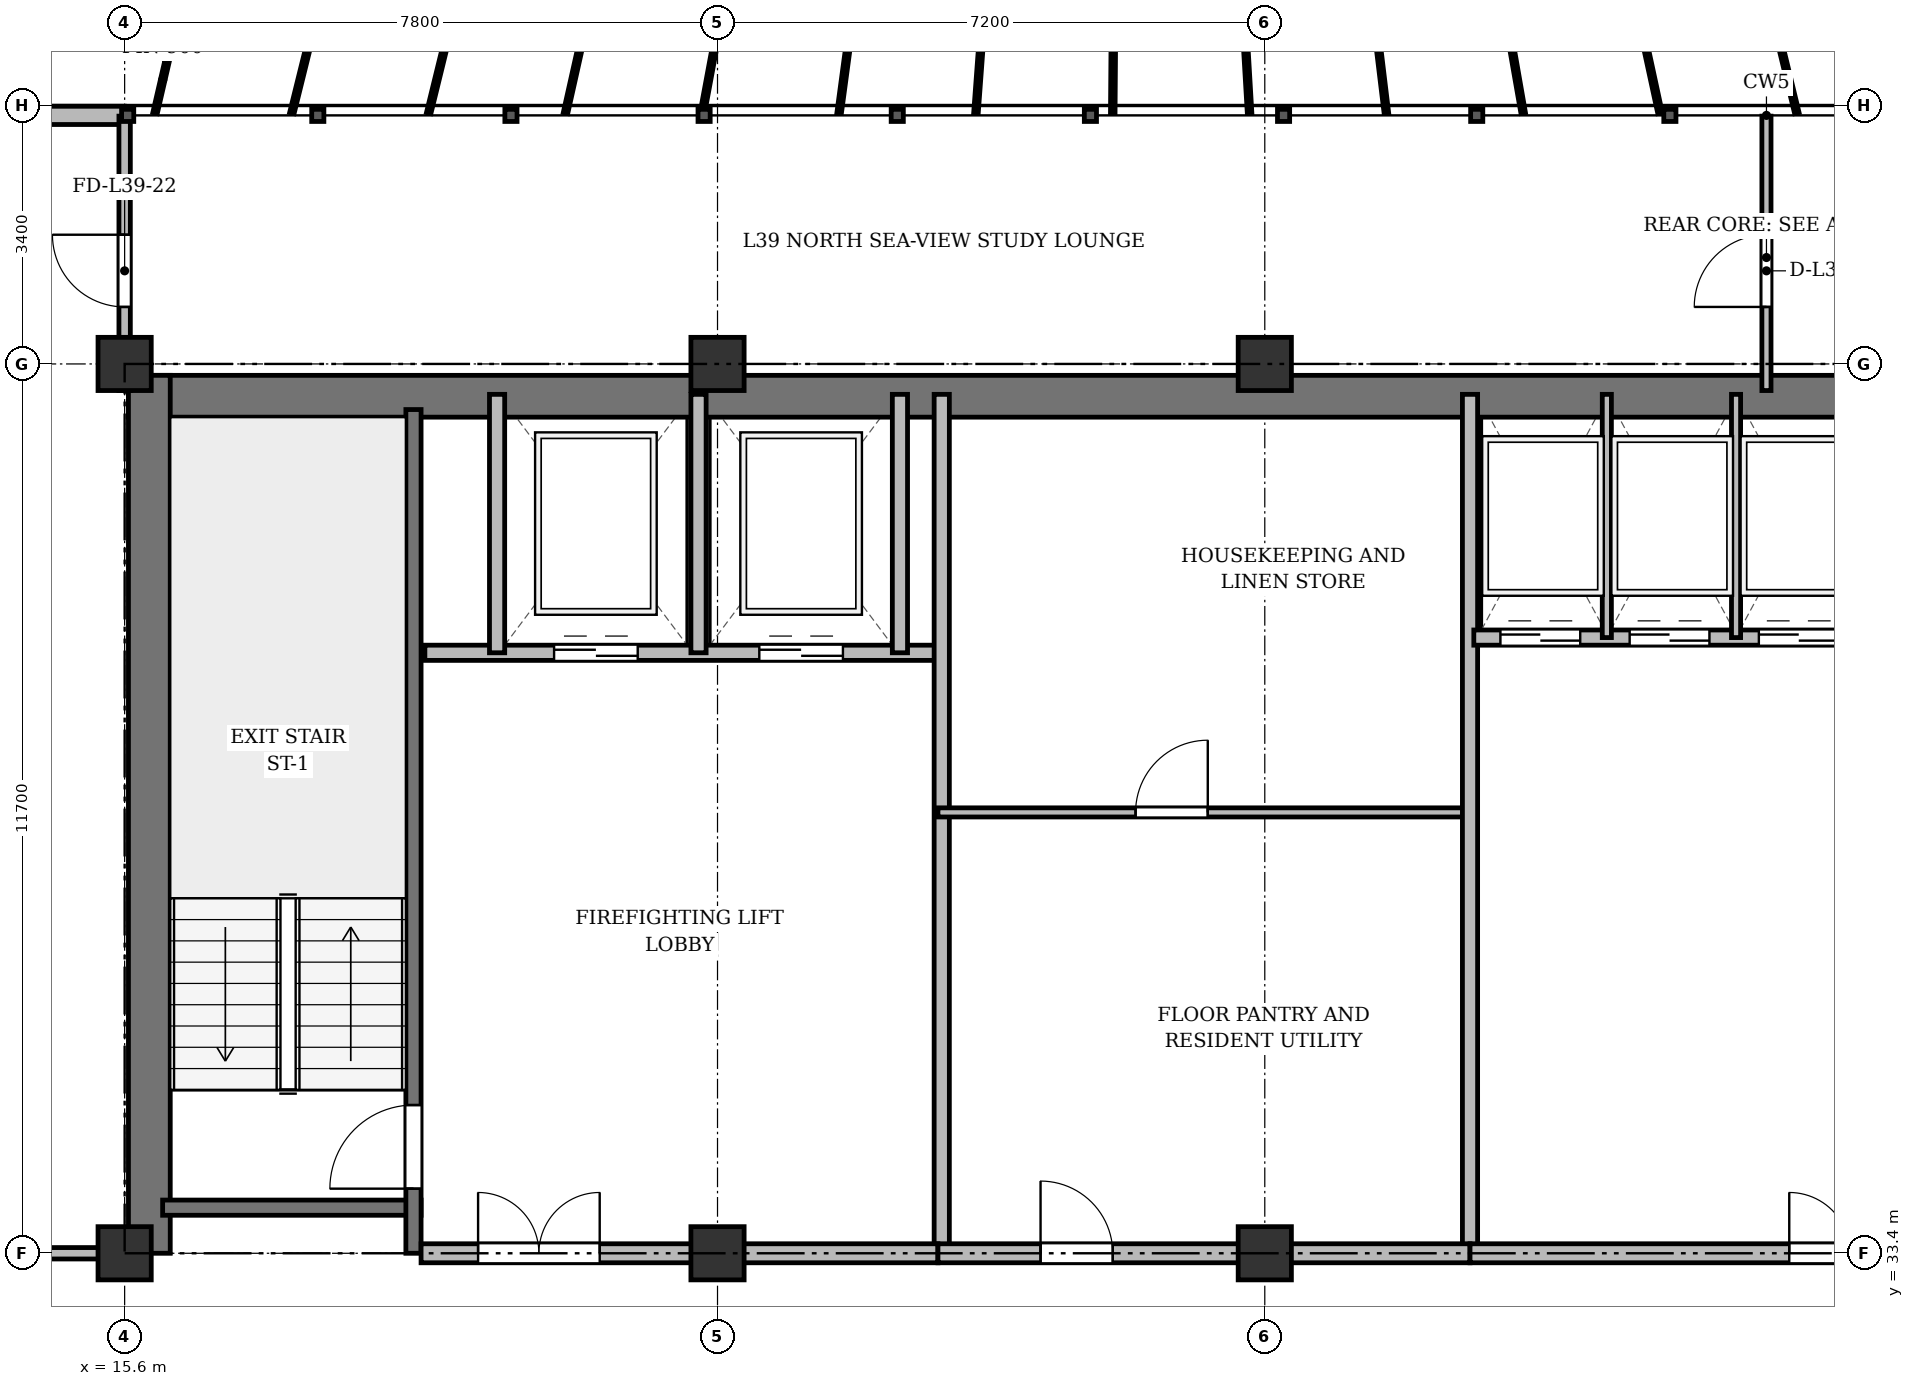
"""IFC4 building model, lengths in metres.
Left out: names, types, materials, properties, quantities, classifications, styles, units other than length and angle.
Written with IfcOpenShell. Run it as: python <this file> out.ifc"""

import sys

from ifc_helpers import new_model, si_unit, direction, frame, frame_2d, origin, origin_2d, place, context, subcontext, project, spatial, rectangle, extrude, source, transform, mapped, element, fill, save


model = new_model("IFC4")
c1 = context("Model", 3, precision=1e-05, world=origin(), true_north=direction((0.0, 1.0)))
c2 = subcontext(c1, "Body", "Model", "MODEL_VIEW")
j1 = project(units=[si_unit("LENGTHUNIT", "METRE"), si_unit("PLANEANGLEUNIT", "RADIAN")], contexts=[c1])
p1 = place(None, origin())
s1 = spatial("IfcSite", under=j1, at=p1, CompositionType="ELEMENT")
p2 = place(p1, origin())
s2 = spatial("IfcBuilding", under=s1, at=p2, CompositionType="ELEMENT")
p3 = place(p2, frame((0.0, 0.0, 150.1)))
s3 = spatial("IfcBuildingStorey", under=s2, at=p3, CompositionType="ELEMENT", Elevation=150.1)
m1 = source(origin(), c2, "Body", "SweptSolid", [
    extrude(rectangle(XDim=0.7, YDim=0.7, at=origin_2d()), origin(), (0.0, 0.0, 1.0), 3.6),
])
for number, where, z_axis, x_axis in (
    (1, (15.6, 33.4, 0.0), (0.0, 0.0, 1.0), (1.0, 0.0, 0.0)),
    (2, (15.6, 45.1, 0.0), (0.0, 0.0, 1.0), (1.0, 0.0, 0.0)),
    (3, (23.4, 33.4, 0.0), (0.0, 0.0, 1.0), (1.0, 0.0, 0.0)),
    (4, (23.4, 45.1, 0.0), (0.0, 0.0, 1.0), (1.0, 0.0, 0.0)),
    (5, (30.6, 33.4, 0.0), (0.0, 0.0, 1.0), (1.0, 0.0, 0.0)),
    (6, (30.6, 45.1, 0.0), (0.0, 0.0, 1.0), (1.0, 0.0, 0.0)),
):
    element("IfcColumn", number, at=place(p3, frame(where, z_axis=z_axis, x_axis=x_axis)), inside=s3, PredefinedType="COLUMN", context=c2, shape_type="MappedRepresentation", body=[
        mapped(m1, transform((0.0, 0.0, 0.0), x_axis=(1.0, 0.0, 0.0), y_axis=(0.0, 1.0, 0.0), z_axis=(0.0, 0.0, 1.0), scale=1.0)),
    ])
p4 = place(p3, frame((10.9, 48.37, 0.0), z_axis=(0.0, 0.0, 1.0), x_axis=(1.0, 0.0, 0.0)))
e7 = element("IfcWall", 7, at=p4, inside=s3, PredefinedType="SOLIDWALL", context=c2, shape_type="SweptSolid", body=[
    extrude(rectangle(XDim=4.7, YDim=0.24, at=frame_2d((2.35, 0.0))), origin(), (0.0, 0.0, 1.0), 3.35),
])
p5 = place(p4, frame((1.675, 0.0, 0.9)))
e8 = element("IfcOpeningElement", 8, at=p5, cuts=e7, PredefinedType="OPENING", context=c2, shape_type="SweptSolid", body=[
    extrude(rectangle(XDim=1.35, YDim=1.5, at=frame_2d((0.675, 0.75))), frame((0.0, 0.13, 0.0), z_axis=(0.0, -1.0, 0.0), x_axis=(1.0, 0.0, 0.0)), (0.0, 0.0, 1.0), 0.26),
])
p6 = place(p3, frame((15.65, 44.675, 0.0), z_axis=(0.0, 0.0, 1.0), x_axis=(1.0, 0.0, 0.0)))
e9 = element("IfcWall", 9, at=p6, inside=s3, PredefinedType="SHEAR", context=c2, shape_type="SweptSolid", body=[
    extrude(rectangle(XDim=43.1, YDim=0.55, at=frame_2d((21.55, 0.0))), origin(), (0.0, 0.0, 1.0), 3.35),
])
p7 = place(p3, frame((15.925, 33.4, 0.0), z_axis=(0.0, 0.0, 1.0), x_axis=(0.0, 1.0, 0.0)))
e10 = element("IfcWall", 10, at=p7, inside=s3, PredefinedType="SHEAR", context=c2, shape_type="SweptSolid", body=[
    extrude(rectangle(XDim=11.55, YDim=0.55, at=frame_2d((5.775, 0.0))), origin(), (0.0, 0.0, 1.0), 3.35),
])
p8 = place(p3, frame((16.1, 34.0, 0.0), z_axis=(0.0, 0.0, 1.0), x_axis=(1.0, 0.0, 0.0)))
e11 = element("IfcWall", 11, at=p8, inside=s3, PredefinedType="SHEAR", context=c2, shape_type="SweptSolid", body=[
    extrude(rectangle(XDim=3.4, YDim=0.2, at=frame_2d((1.7, 0.0))), origin(), (0.0, 0.0, 1.0), 3.35),
])
p9 = place(p3, frame((19.4, 33.4, 0.0), z_axis=(0.0, 0.0, 1.0), x_axis=(0.0, 1.0, 0.0)))
e12 = element("IfcWall", 12, at=p9, inside=s3, PredefinedType="SHEAR", context=c2, shape_type="SweptSolid", body=[
    extrude(rectangle(XDim=11.1, YDim=0.2, at=frame_2d((5.55, 0.0))), origin(), (0.0, 0.0, 1.0), 3.35),
])
p10 = place(p9, frame((0.85, 0.0, 0.0)))
e13 = element("IfcOpeningElement", 13, at=p10, cuts=e12, PredefinedType="OPENING", context=c2, shape_type="SweptSolid", body=[
    extrude(rectangle(XDim=1.1, YDim=2.15, at=frame_2d((0.55, 1.075))), frame((0.0, 0.11, 0.0), z_axis=(0.0, -1.0, 0.0), x_axis=(1.0, 0.0, 0.0)), (0.0, 0.0, 1.0), 0.22),
])
p11 = place(p3, frame((19.55, 41.3, 0.0), z_axis=(0.0, 0.0, 1.0), x_axis=(1.0, 0.0, 0.0)))
e14 = element("IfcWall", 14, at=p11, inside=s3, PredefinedType="SOLIDWALL", context=c2, shape_type="SweptSolid", body=[
    extrude(rectangle(XDim=6.75, YDim=0.2, at=frame_2d((3.375, 0.0))), origin(), (0.0, 0.0, 1.0), 3.35),
])
p12 = place(p11, frame((1.7, 0.0, 0.0)))
e15 = element("IfcOpeningElement", 15, at=p12, cuts=e14, PredefinedType="OPENING", context=c2, shape_type="SweptSolid", body=[
    extrude(rectangle(XDim=1.1, YDim=2.15, at=frame_2d((0.55, 1.075))), frame((0.0, 0.11, 0.0), z_axis=(0.0, -1.0, 0.0), x_axis=(1.0, 0.0, 0.0)), (0.0, 0.0, 1.0), 0.22),
])
p13 = place(p11, frame((4.4, 0.0, 0.0)))
e16 = element("IfcOpeningElement", 16, at=p13, cuts=e14, PredefinedType="OPENING", context=c2, shape_type="SweptSolid", body=[
    extrude(rectangle(XDim=1.1, YDim=2.15, at=frame_2d((0.55, 1.075))), frame((0.0, 0.11, 0.0), z_axis=(0.0, -1.0, 0.0), x_axis=(1.0, 0.0, 0.0)), (0.0, 0.0, 1.0), 0.22),
])
for number, where, z_axis, x_axis in (
    (17, (20.5, 41.3, 0.0), (0.0, 0.0, 1.0), (0.0, 1.0, 0.0)),
    (18, (23.15, 41.3, 0.0), (0.0, 0.0, 1.0), (0.0, 1.0, 0.0)),
    (19, (25.8, 41.3, 0.0), (0.0, 0.0, 1.0), (0.0, 1.0, 0.0)),
):
    element("IfcWall", number, at=place(p3, frame(where, z_axis=z_axis, x_axis=x_axis)), inside=s3, PredefinedType="SOLIDWALL", context=c2, shape_type="SweptSolid", body=[
        extrude(rectangle(XDim=3.4, YDim=0.2, at=frame_2d((1.7, 0.0))), origin(), (0.0, 0.0, 1.0), 3.35),
    ])
p14 = place(p3, frame((26.35, 33.4, 0.0), z_axis=(0.0, 0.0, 1.0), x_axis=(0.0, 1.0, 0.0)))
e20 = element("IfcWall", 20, at=p14, inside=s3, PredefinedType="SOLIDWALL", context=c2, shape_type="SweptSolid", body=[
    extrude(rectangle(XDim=11.3, YDim=0.2, at=frame_2d((5.65, 0.0))), origin(), (0.0, 0.0, 1.0), 2.75),
])
p15 = place(p3, frame((19.5, 33.4, 0.0), z_axis=(0.0, 0.0, 1.0), x_axis=(1.0, 0.0, 0.0)))
e21 = element("IfcWall", 21, at=p15, inside=s3, PredefinedType="PARTITIONING", context=c2, shape_type="SweptSolid", body=[
    extrude(rectangle(XDim=6.8, YDim=0.25, at=frame_2d((3.4, 0.0))), origin(), (0.0, 0.0, 1.0), 2.75),
])
p16 = place(p15, frame((0.75, 0.0, 0.0)))
e22 = element("IfcOpeningElement", 22, at=p16, cuts=e21, PredefinedType="OPENING", context=c2, shape_type="SweptSolid", body=[
    extrude(rectangle(XDim=1.6, YDim=2.2, at=frame_2d((0.8, 1.1))), frame((0.0, 0.135, 0.0), z_axis=(0.0, -1.0, 0.0), x_axis=(1.0, 0.0, 0.0)), (0.0, 0.0, 1.0), 0.27),
])
p17 = place(p3, frame((26.3, 39.2, 0.0), z_axis=(0.0, 0.0, 1.0), x_axis=(1.0, 0.0, 0.0)))
e23 = element("IfcWall", 23, at=p17, inside=s3, PredefinedType="PARTITIONING", context=c2, shape_type="SweptSolid", body=[
    extrude(rectangle(XDim=7.0, YDim=0.12, at=frame_2d((3.5, 0.0))), origin(), (0.0, 0.0, 1.0), 2.85),
])
p18 = place(p17, frame((2.6, 0.0, 0.0)))
e24 = element("IfcOpeningElement", 24, at=p18, cuts=e23, PredefinedType="OPENING", context=c2, shape_type="SweptSolid", body=[
    extrude(rectangle(XDim=0.95, YDim=2.15, at=frame_2d((0.475, 1.075))), frame((0.0, 0.07, 0.0), z_axis=(0.0, -1.0, 0.0), x_axis=(1.0, 0.0, 0.0)), (0.0, 0.0, 1.0), 0.14),
])
p19 = place(p3, frame((33.3, 33.4, 0.0), z_axis=(0.0, 0.0, 1.0), x_axis=(0.0, 1.0, 0.0)))
e25 = element("IfcWall", 25, at=p19, inside=s3, PredefinedType="SOLIDWALL", context=c2, shape_type="SweptSolid", body=[
    extrude(rectangle(XDim=11.3, YDim=0.2, at=frame_2d((5.65, 0.0))), origin(), (0.0, 0.0, 1.0), 2.75),
])
p20 = place(p3, frame((33.35, 41.5, 0.0), z_axis=(0.0, 0.0, 1.0), x_axis=(1.0, 0.0, 0.0)))
e26 = element("IfcWall", 26, at=p20, inside=s3, PredefinedType="SOLIDWALL", context=c2, shape_type="SweptSolid", body=[
    extrude(rectangle(XDim=6.9, YDim=0.2, at=frame_2d((3.45, 0.0))), origin(), (0.0, 0.0, 1.0), 3.35),
])
p21 = place(p20, frame((0.35, 0.0, 0.0)))
e27 = element("IfcOpeningElement", 27, at=p21, cuts=e26, PredefinedType="OPENING", context=c2, shape_type="SweptSolid", body=[
    extrude(rectangle(XDim=1.05, YDim=2.15, at=frame_2d((0.525, 1.075))), frame((0.0, 0.11, 0.0), z_axis=(0.0, -1.0, 0.0), x_axis=(1.0, 0.0, 0.0)), (0.0, 0.0, 1.0), 0.22),
])
p22 = place(p20, frame((2.05, 0.0, 0.0)))
e28 = element("IfcOpeningElement", 28, at=p22, cuts=e26, PredefinedType="OPENING", context=c2, shape_type="SweptSolid", body=[
    extrude(rectangle(XDim=1.05, YDim=2.15, at=frame_2d((0.525, 1.075))), frame((0.0, 0.11, 0.0), z_axis=(0.0, -1.0, 0.0), x_axis=(1.0, 0.0, 0.0)), (0.0, 0.0, 1.0), 0.22),
])
p23 = place(p20, frame((3.75, 0.0, 0.0)))
e29 = element("IfcOpeningElement", 29, at=p23, cuts=e26, PredefinedType="OPENING", context=c2, shape_type="SweptSolid", body=[
    extrude(rectangle(XDim=1.05, YDim=2.15, at=frame_2d((0.525, 1.075))), frame((0.0, 0.11, 0.0), z_axis=(0.0, -1.0, 0.0), x_axis=(1.0, 0.0, 0.0)), (0.0, 0.0, 1.0), 0.22),
])
p24 = place(p20, frame((5.45, 0.0, 0.0)))
e30 = element("IfcOpeningElement", 30, at=p24, cuts=e26, PredefinedType="OPENING", context=c2, shape_type="SweptSolid", body=[
    extrude(rectangle(XDim=1.05, YDim=2.15, at=frame_2d((0.525, 1.075))), frame((0.0, 0.11, 0.0), z_axis=(0.0, -1.0, 0.0), x_axis=(1.0, 0.0, 0.0)), (0.0, 0.0, 1.0), 0.22),
])
for number, where, z_axis, x_axis in (
    (31, (35.1, 41.5, 0.0), (0.0, 0.0, 1.0), (0.0, 1.0, 0.0)),
    (32, (36.8, 41.5, 0.0), (0.0, 0.0, 1.0), (0.0, 1.0, 0.0)),
):
    element("IfcWall", number, at=place(p3, frame(where, z_axis=z_axis, x_axis=x_axis)), inside=s3, PredefinedType="PARTITIONING", context=c2, shape_type="SweptSolid", body=[
        extrude(rectangle(XDim=3.2, YDim=0.12, at=frame_2d((1.6, 0.0))), origin(), (0.0, 0.0, 1.0), 3.35),
    ])
p25 = place(p3, frame((26.3, 33.4, 0.0), z_axis=(0.0, 0.0, 1.0), x_axis=(1.0, 0.0, 0.0)))
e33 = element("IfcWall", 33, at=p25, inside=s3, PredefinedType="PARTITIONING", context=c2, shape_type="SweptSolid", body=[
    extrude(rectangle(XDim=7.0, YDim=0.25, at=frame_2d((3.5, 0.0))), origin(), (0.0, 0.0, 1.0), 2.75),
])
p26 = place(p25, frame((1.35, 0.0, 0.0)))
e34 = element("IfcOpeningElement", 34, at=p26, cuts=e33, PredefinedType="OPENING", context=c2, shape_type="SweptSolid", body=[
    extrude(rectangle(XDim=0.95, YDim=2.15, at=frame_2d((0.475, 1.075))), frame((0.0, 0.135, 0.0), z_axis=(0.0, -1.0, 0.0), x_axis=(1.0, 0.0, 0.0)), (0.0, 0.0, 1.0), 0.27),
])
p27 = place(p3, frame((33.3, 33.4, 0.0), z_axis=(0.0, 0.0, 1.0), x_axis=(1.0, 0.0, 0.0)))
e35 = element("IfcWall", 35, at=p27, inside=s3, PredefinedType="PARTITIONING", context=c2, shape_type="SweptSolid", body=[
    extrude(rectangle(XDim=13.85, YDim=0.25, at=frame_2d((6.925, 0.0))), origin(), (0.0, 0.0, 1.0), 2.75),
])
p28 = place(p27, frame((4.2, 0.0, 0.0)))
e36 = element("IfcOpeningElement", 36, at=p28, cuts=e35, PredefinedType="OPENING", context=c2, shape_type="SweptSolid", body=[
    extrude(rectangle(XDim=1.6, YDim=2.2, at=frame_2d((0.8, 1.1))), frame((0.0, 0.135, 0.0), z_axis=(0.0, -1.0, 0.0), x_axis=(1.0, 0.0, 0.0)), (0.0, 0.0, 1.0), 0.27),
])
p29 = place(p3, frame((8.05, 33.4, 0.0), z_axis=(0.0, 0.0, 1.0), x_axis=(1.0, 0.0, 0.0)))
e37 = element("IfcWall", 37, at=p29, inside=s3, PredefinedType="PARTITIONING", context=c2, shape_type="SweptSolid", body=[
    extrude(rectangle(XDim=7.55, YDim=0.15, at=frame_2d((3.775, 0.0))), origin(), (0.0, 0.0, 1.0), 2.75),
])
p30 = place(p29, frame((3.2, 0.0, 0.0)))
e38 = element("IfcOpeningElement", 38, at=p30, cuts=e37, PredefinedType="OPENING", context=c2, shape_type="SweptSolid", body=[
    extrude(rectangle(XDim=0.95, YDim=2.15, at=frame_2d((0.475, 1.075))), frame((0.0, 0.085, 0.0), z_axis=(0.0, -1.0, 0.0), x_axis=(1.0, 0.0, 0.0)), (0.0, 0.0, 1.0), 0.17),
])
p31 = place(p3, frame((37.2, 44.75, 0.0), z_axis=(0.0, 0.0, 1.0), x_axis=(0.0, 1.0, 0.0)))
e39 = element("IfcWall", 39, at=p31, inside=s3, PredefinedType="PARTITIONING", context=c2, shape_type="SweptSolid", body=[
    extrude(rectangle(XDim=3.61, YDim=0.12, at=frame_2d((1.805, 0.0))), origin(), (0.0, 0.0, 1.0), 2.75),
])
p32 = place(p31, frame((1.1, 0.0, 0.0)))
e40 = element("IfcOpeningElement", 40, at=p32, cuts=e39, PredefinedType="OPENING", context=c2, shape_type="SweptSolid", body=[
    extrude(rectangle(XDim=0.95, YDim=2.15, at=frame_2d((0.475, 1.075))), frame((0.0, 0.07, 0.0), z_axis=(0.0, -1.0, 0.0), x_axis=(1.0, 0.0, 0.0)), (0.0, 0.0, 1.0), 0.14),
])
p33 = place(p3, frame((15.6, 44.75, 0.0), z_axis=(0.0, 0.0, 1.0), x_axis=(0.0, 1.0, 0.0)))
e41 = element("IfcWall", 41, at=p33, inside=s3, PredefinedType="PARTITIONING", context=c2, shape_type="SweptSolid", body=[
    extrude(rectangle(XDim=3.61, YDim=0.15, at=frame_2d((1.805, 0.0))), origin(), (0.0, 0.0, 1.0), 2.85),
])
p34 = place(p33, frame((1.1, 0.0, 0.0)))
e42 = element("IfcOpeningElement", 42, at=p34, cuts=e41, PredefinedType="OPENING", context=c2, shape_type="SweptSolid", body=[
    extrude(rectangle(XDim=0.95, YDim=2.15, at=frame_2d((0.475, 1.075))), frame((0.0, 0.085, 0.0), z_axis=(0.0, -1.0, 0.0), x_axis=(1.0, 0.0, 0.0)), (0.0, 0.0, 1.0), 0.17),
])
m2 = source(origin(), c2, "Body", "SweptSolid", [
    extrude(rectangle(XDim=1.1, YDim=2.15, at=frame_2d((0.55, 1.075))), frame((0.0, 0.025, 0.0), z_axis=(0.0, -1.0, 0.0), x_axis=(1.0, 0.0, 0.0)), (0.0, 0.0, 1.0), 0.05),
])
p35 = place(p10, origin())
e43 = element("IfcDoor", 43, at=p35, inside=s3, OperationType="SINGLE_SWING_LEFT", PredefinedType="DOOR", context=c2, shape_type="MappedRepresentation", body=[
    mapped(m2, transform((0.0, 0.0, 0.0), x_axis=(1.0, 0.0, 0.0), y_axis=(0.0, 1.0, 0.0), z_axis=(0.0, 0.0, 1.0), scale=1.0)),
])
fill(e13, e43)
p36 = place(p12, origin())
e44 = element("IfcDoor", 44, at=p36, inside=s3, OperationType="DOUBLE_DOOR_SLIDING", PredefinedType="DOOR", context=c2, shape_type="MappedRepresentation", body=[
    mapped(m2, transform((0.0, 0.0, 0.0), x_axis=(1.0, 0.0, 0.0), y_axis=(0.0, 1.0, 0.0), z_axis=(0.0, 0.0, 1.0), scale=1.0)),
])
fill(e15, e44)
p37 = place(p13, origin())
e45 = element("IfcDoor", 45, at=p37, inside=s3, OperationType="DOUBLE_DOOR_SLIDING", PredefinedType="DOOR", context=c2, shape_type="MappedRepresentation", body=[
    mapped(m2, transform((0.0, 0.0, 0.0), x_axis=(1.0, 0.0, 0.0), y_axis=(0.0, 1.0, 0.0), z_axis=(0.0, 0.0, 1.0), scale=1.0)),
])
fill(e16, e45)
m3 = source(origin(), c2, "Body", "SweptSolid", [
    extrude(rectangle(XDim=1.6, YDim=2.2, at=frame_2d((0.8, 1.1))), frame((0.0, 0.025, 0.0), z_axis=(0.0, -1.0, 0.0), x_axis=(1.0, 0.0, 0.0)), (0.0, 0.0, 1.0), 0.05),
])
p38 = place(p16, origin())
e46 = element("IfcDoor", 46, at=p38, inside=s3, OperationType="DOUBLE_DOOR_SINGLE_SWING", PredefinedType="DOOR", context=c2, shape_type="MappedRepresentation", body=[
    mapped(m3, transform((0.0, 0.0, 0.0), x_axis=(1.0, 0.0, 0.0), y_axis=(0.0, 1.0, 0.0), z_axis=(0.0, 0.0, 1.0), scale=1.0)),
])
fill(e22, e46)
m4 = source(origin(), c2, "Body", "SweptSolid", [
    extrude(rectangle(XDim=0.95, YDim=2.15, at=frame_2d((0.475, 1.075))), frame((0.0, 0.025, 0.0), z_axis=(0.0, -1.0, 0.0), x_axis=(1.0, 0.0, 0.0)), (0.0, 0.0, 1.0), 0.05),
])
p39 = place(p18, origin())
e47 = element("IfcDoor", 47, at=p39, inside=s3, OperationType="SINGLE_SWING_RIGHT", PredefinedType="DOOR", context=c2, shape_type="MappedRepresentation", body=[
    mapped(m4, transform((0.0, 0.0, 0.0), x_axis=(1.0, 0.0, 0.0), y_axis=(0.0, 1.0, 0.0), z_axis=(0.0, 0.0, 1.0), scale=1.0)),
])
fill(e24, e47)
m5 = source(origin(), c2, "Body", "SweptSolid", [
    extrude(rectangle(XDim=1.05, YDim=2.15, at=frame_2d((0.525, 1.075))), frame((0.0, 0.025, 0.0), z_axis=(0.0, -1.0, 0.0), x_axis=(1.0, 0.0, 0.0)), (0.0, 0.0, 1.0), 0.05),
])
p40 = place(p21, origin())
e48 = element("IfcDoor", 48, at=p40, inside=s3, OperationType="DOUBLE_DOOR_SLIDING", PredefinedType="DOOR", context=c2, shape_type="MappedRepresentation", body=[
    mapped(m5, transform((0.0, 0.0, 0.0), x_axis=(1.0, 0.0, 0.0), y_axis=(0.0, 1.0, 0.0), z_axis=(0.0, 0.0, 1.0), scale=1.0)),
])
fill(e27, e48)
p41 = place(p22, origin())
e49 = element("IfcDoor", 49, at=p41, inside=s3, OperationType="DOUBLE_DOOR_SLIDING", PredefinedType="DOOR", context=c2, shape_type="MappedRepresentation", body=[
    mapped(m5, transform((0.0, 0.0, 0.0), x_axis=(1.0, 0.0, 0.0), y_axis=(0.0, 1.0, 0.0), z_axis=(0.0, 0.0, 1.0), scale=1.0)),
])
fill(e28, e49)
p42 = place(p23, origin())
e50 = element("IfcDoor", 50, at=p42, inside=s3, OperationType="DOUBLE_DOOR_SLIDING", PredefinedType="DOOR", context=c2, shape_type="MappedRepresentation", body=[
    mapped(m5, transform((0.0, 0.0, 0.0), x_axis=(1.0, 0.0, 0.0), y_axis=(0.0, 1.0, 0.0), z_axis=(0.0, 0.0, 1.0), scale=1.0)),
])
fill(e29, e50)
p43 = place(p26, origin())
e51 = element("IfcDoor", 51, at=p43, inside=s3, OperationType="SINGLE_SWING_LEFT", PredefinedType="DOOR", context=c2, shape_type="MappedRepresentation", body=[
    mapped(m4, transform((0.0, 0.0, 0.0), x_axis=(1.0, 0.0, 0.0), y_axis=(0.0, 1.0, 0.0), z_axis=(0.0, 0.0, 1.0), scale=1.0)),
])
fill(e34, e51)
p44 = place(p28, origin())
e52 = element("IfcDoor", 52, at=p44, inside=s3, OperationType="DOUBLE_DOOR_SINGLE_SWING", PredefinedType="DOOR", context=c2, shape_type="MappedRepresentation", body=[
    mapped(m3, transform((0.0, 0.0, 0.0), x_axis=(1.0, 0.0, 0.0), y_axis=(0.0, 1.0, 0.0), z_axis=(0.0, 0.0, 1.0), scale=1.0)),
])
fill(e36, e52)
p45 = place(p32, origin())
e53 = element("IfcDoor", 53, at=p45, inside=s3, OperationType="SINGLE_SWING_LEFT", PredefinedType="DOOR", context=c2, shape_type="MappedRepresentation", body=[
    mapped(m4, transform((0.0, 0.0, 0.0), x_axis=(1.0, 0.0, 0.0), y_axis=(0.0, 1.0, 0.0), z_axis=(0.0, 0.0, 1.0), scale=1.0)),
])
fill(e40, e53)
p46 = place(p34, origin())
e54 = element("IfcDoor", 54, at=p46, inside=s3, OperationType="SINGLE_SWING_RIGHT", PredefinedType="DOOR", context=c2, shape_type="MappedRepresentation", body=[
    mapped(m4, transform((0.0, 0.0, 0.0), x_axis=(1.0, 0.0, 0.0), y_axis=(0.0, 1.0, 0.0), z_axis=(0.0, 0.0, 1.0), scale=1.0)),
])
fill(e42, e54)
save(model, sys.argv[1])
